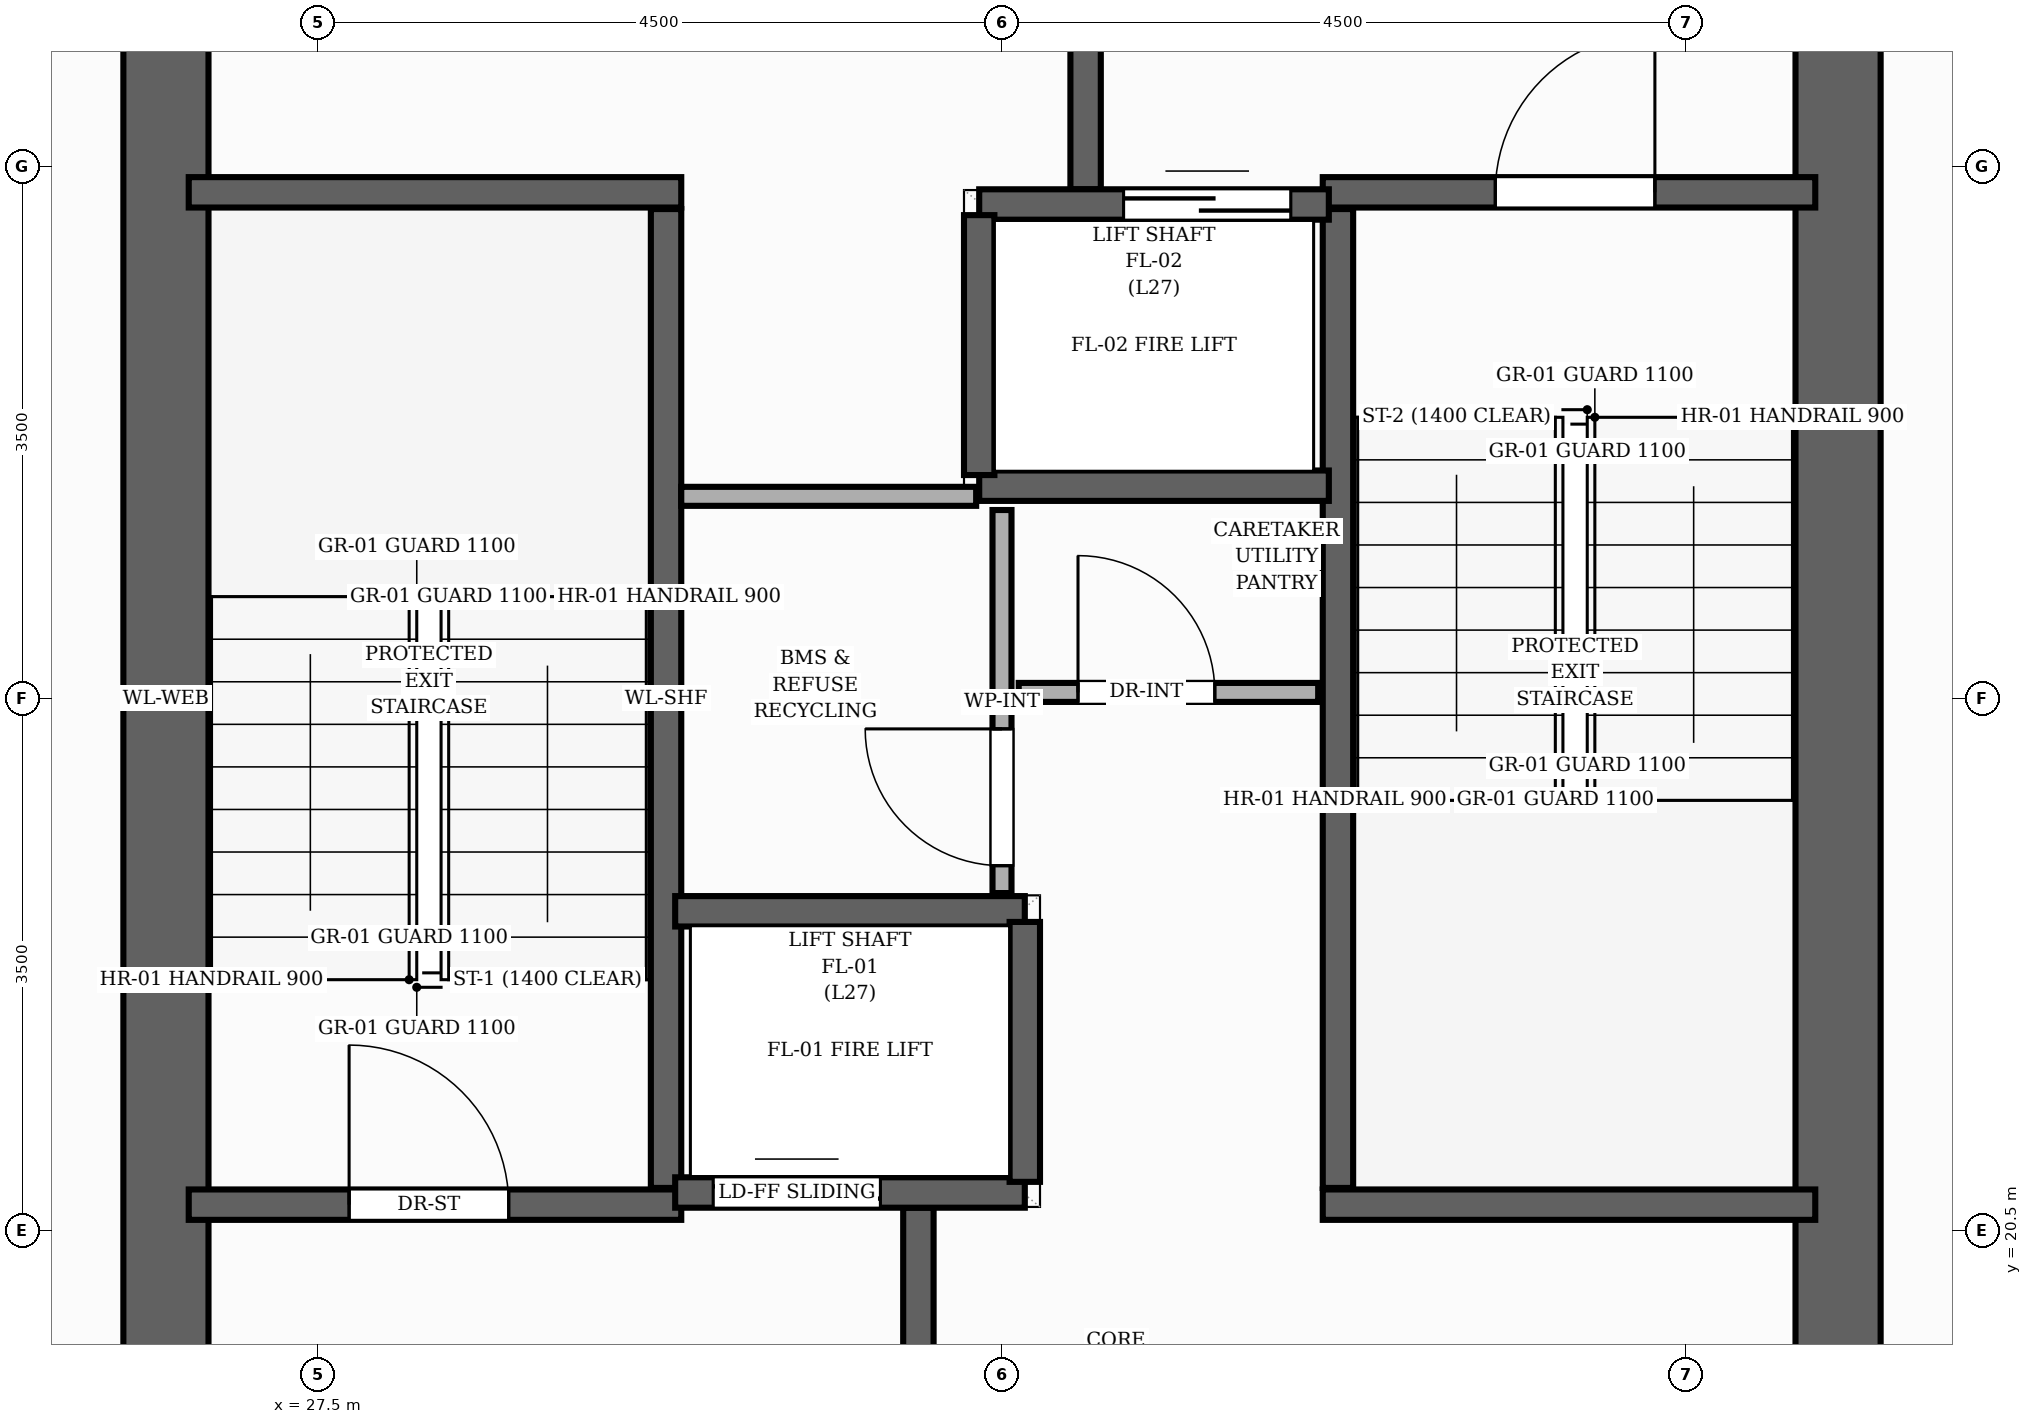
"""IFC4 building model, lengths in metres.
Left out: names, types, materials, properties, quantities, classifications, styles, units other than length and angle.
Written with IfcOpenShell. Run it as: python <this file> out.ifc"""

import sys

from ifc_helpers import new_model, si_unit, direction, frame, frame_2d, origin, place, context, subcontext, project, spatial, rectangle, extrude, element, fill, save


model = new_model("IFC4")
c1 = context("Model", 3, precision=1e-05, world=origin(), true_north=direction((0.0, 1.0)))
c2 = subcontext(c1, "Body", "Model", "MODEL_VIEW")
j1 = project(units=[si_unit("LENGTHUNIT", "METRE"), si_unit("PLANEANGLEUNIT", "RADIAN")], contexts=[c1])
p1 = place(None, origin())
s1 = spatial("IfcSite", under=j1, at=p1, CompositionType="ELEMENT")
p2 = place(p1, origin())
s2 = spatial("IfcBuilding", under=s1, at=p2, CompositionType="ELEMENT")
p3 = place(p2, frame((0.0, 0.0, 93.28)))
s3 = spatial("IfcBuildingStorey", under=s2, at=p3, CompositionType="ELEMENT", Elevation=93.28)
for number, where, z_axis, x_axis in (
    (1, (26.5, 17.35, 0.0), (0.0, 0.0, 1.0), (0.0, 1.0, 0.0)),
    (2, (37.5, 17.35, 0.0), (0.0, 0.0, 1.0), (0.0, 1.0, 0.0)),
):
    element("IfcWall", number, at=place(p3, frame(where, z_axis=z_axis, x_axis=x_axis)), inside=s3, PredefinedType="SHEAR", context=c2, shape_type="SweptSolid", body=[
        extrude(rectangle(XDim=13.3, YDim=0.56, at=frame_2d((6.65, 0.0))), origin(), (0.0, 0.0, 1.0), 3.2),
    ])
p4 = place(p3, frame((29.79, 20.78, 0.0), z_axis=(0.0, 0.0, 1.0), x_axis=(0.0, 1.0, 0.0)))
e3 = element("IfcWall", 3, at=p4, inside=s3, PredefinedType="SHEAR", context=c2, shape_type="SweptSolid", body=[
    extrude(rectangle(XDim=6.44, YDim=0.2, at=frame_2d((3.22, 0.0))), origin(), (0.0, 0.0, 1.0), 3.2),
])
p5 = place(p3, frame((26.65, 27.33, 0.0), z_axis=(0.0, 0.0, 1.0), x_axis=(1.0, 0.0, 0.0)))
e4 = element("IfcWall", 4, at=p5, inside=s3, PredefinedType="SHEAR", context=c2, shape_type="SweptSolid", body=[
    extrude(rectangle(XDim=3.24, YDim=0.2, at=frame_2d((1.62, 0.0))), origin(), (0.0, 0.0, 1.0), 3.2),
])
p6 = place(p3, frame((26.65, 20.67, 0.0), z_axis=(0.0, 0.0, 1.0), x_axis=(1.0, 0.0, 0.0)))
e5 = element("IfcWall", 5, at=p6, inside=s3, PredefinedType="SHEAR", context=c2, shape_type="SweptSolid", body=[
    extrude(rectangle(XDim=3.24, YDim=0.2, at=frame_2d((1.62, 0.0))), origin(), (0.0, 0.0, 1.0), 3.2),
])
p7 = place(p6, frame((1.055, 0.0, 0.0)))
e6 = element("IfcOpeningElement", 6, at=p7, cuts=e5, PredefinedType="OPENING", context=c2, shape_type="SweptSolid", body=[
    extrude(rectangle(XDim=1.05, YDim=2.15, at=frame_2d((0.525, 1.075))), frame((0.0, 0.11, 0.0), z_axis=(0.0, -1.0, 0.0), x_axis=(1.0, 0.0, 0.0)), (0.0, 0.0, 1.0), 0.22),
])
p8 = place(p3, frame((34.21, 20.78, 0.0), z_axis=(0.0, 0.0, 1.0), x_axis=(0.0, 1.0, 0.0)))
e7 = element("IfcWall", 7, at=p8, inside=s3, PredefinedType="SHEAR", context=c2, shape_type="SweptSolid", body=[
    extrude(rectangle(XDim=6.44, YDim=0.2, at=frame_2d((3.22, 0.0))), origin(), (0.0, 0.0, 1.0), 3.2),
])
p9 = place(p3, frame((34.11, 20.67, 0.0), z_axis=(0.0, 0.0, 1.0), x_axis=(1.0, 0.0, 0.0)))
e8 = element("IfcWall", 8, at=p9, inside=s3, PredefinedType="SHEAR", context=c2, shape_type="SweptSolid", body=[
    extrude(rectangle(XDim=3.24, YDim=0.2, at=frame_2d((1.62, 0.0))), origin(), (0.0, 0.0, 1.0), 3.2),
])
p10 = place(p3, frame((34.11, 27.33, 0.0), z_axis=(0.0, 0.0, 1.0), x_axis=(1.0, 0.0, 0.0)))
e9 = element("IfcWall", 9, at=p10, inside=s3, PredefinedType="SHEAR", context=c2, shape_type="SweptSolid", body=[
    extrude(rectangle(XDim=3.24, YDim=0.2, at=frame_2d((1.62, 0.0))), origin(), (0.0, 0.0, 1.0), 3.2),
])
p11 = place(p10, frame((1.135, 0.0, 0.0)))
e10 = element("IfcOpeningElement", 10, at=p11, cuts=e9, PredefinedType="OPENING", context=c2, shape_type="SweptSolid", body=[
    extrude(rectangle(XDim=1.05, YDim=2.15, at=frame_2d((0.525, 1.075))), frame((0.0, 0.11, 0.0), z_axis=(0.0, -1.0, 0.0), x_axis=(1.0, 0.0, 0.0)), (0.0, 0.0, 1.0), 0.22),
])
for number, where, z_axis, x_axis in (
    (11, (31.45, 17.15, 0.0), (0.0, 0.0, 1.0), (0.0, 1.0, 0.0)),
    (12, (32.55, 27.35, 0.0), (0.0, 0.0, 1.0), (0.0, 1.0, 0.0)),
):
    element("IfcWall", number, at=place(p3, frame(where, z_axis=z_axis, x_axis=x_axis)), inside=s3, PredefinedType="SHEAR", context=c2, shape_type="SweptSolid", body=[
        extrude(rectangle(XDim=3.5, YDim=0.2, at=frame_2d((1.75, 0.0))), origin(), (0.0, 0.0, 1.0), 3.2),
    ])
p12 = place(p3, frame((29.85, 20.75, 0.0), z_axis=(0.0, 0.0, 1.0), x_axis=(1.0, 0.0, 0.0)))
e13 = element("IfcWall", 13, at=p12, inside=s3, PredefinedType="SHEAR", context=c2, shape_type="SweptSolid", body=[
    extrude(rectangle(XDim=2.3, YDim=0.2, at=frame_2d((1.15, 0.0))), origin(), (0.0, 0.0, 1.0), 3.2),
])
p13 = place(p12, frame((0.25, 0.0, 0.0)))
e14 = element("IfcOpeningElement", 14, at=p13, cuts=e13, PredefinedType="OPENING", context=c2, shape_type="SweptSolid", body=[
    extrude(rectangle(XDim=1.1, YDim=2.15, at=frame_2d((0.55, 1.075))), frame((0.0, 0.11, 0.0), z_axis=(0.0, -1.0, 0.0), x_axis=(1.0, 0.0, 0.0)), (0.0, 0.0, 1.0), 0.22),
])
p14 = place(p3, frame((29.85, 22.6, 0.0), z_axis=(0.0, 0.0, 1.0), x_axis=(1.0, 0.0, 0.0)))
e15 = element("IfcWall", 15, at=p14, inside=s3, PredefinedType="SHEAR", context=c2, shape_type="SweptSolid", body=[
    extrude(rectangle(XDim=2.3, YDim=0.2, at=frame_2d((1.15, 0.0))), origin(), (0.0, 0.0, 1.0), 3.2),
])
p15 = place(p3, frame((32.15, 20.82, 0.0), z_axis=(0.0, 0.0, 1.0), x_axis=(0.0, 1.0, 0.0)))
e16 = element("IfcWall", 16, at=p15, inside=s3, PredefinedType="SHEAR", context=c2, shape_type="SweptSolid", body=[
    extrude(rectangle(XDim=1.71, YDim=0.2, at=frame_2d((0.855, 0.0))), origin(), (0.0, 0.0, 1.0), 3.2),
])
p16 = place(p3, frame((31.85, 27.25, 0.0), z_axis=(0.0, 0.0, 1.0), x_axis=(1.0, 0.0, 0.0)))
e17 = element("IfcWall", 17, at=p16, inside=s3, PredefinedType="SHEAR", context=c2, shape_type="SweptSolid", body=[
    extrude(rectangle(XDim=2.3, YDim=0.2, at=frame_2d((1.15, 0.0))), origin(), (0.0, 0.0, 1.0), 3.2),
])
p17 = place(p16, frame((0.95, 0.0, 0.0)))
e18 = element("IfcOpeningElement", 18, at=p17, cuts=e17, PredefinedType="OPENING", context=c2, shape_type="SweptSolid", body=[
    extrude(rectangle(XDim=1.1, YDim=2.15, at=frame_2d((0.55, 1.075))), frame((0.0, 0.11, 0.0), z_axis=(0.0, -1.0, 0.0), x_axis=(1.0, 0.0, 0.0)), (0.0, 0.0, 1.0), 0.22),
])
p18 = place(p3, frame((31.85, 25.4, 0.0), z_axis=(0.0, 0.0, 1.0), x_axis=(1.0, 0.0, 0.0)))
e19 = element("IfcWall", 19, at=p18, inside=s3, PredefinedType="SHEAR", context=c2, shape_type="SweptSolid", body=[
    extrude(rectangle(XDim=2.3, YDim=0.2, at=frame_2d((1.15, 0.0))), origin(), (0.0, 0.0, 1.0), 3.2),
])
p19 = place(p3, frame((31.85, 25.47, 0.0), z_axis=(0.0, 0.0, 1.0), x_axis=(0.0, 1.0, 0.0)))
e20 = element("IfcWall", 20, at=p19, inside=s3, PredefinedType="SHEAR", context=c2, shape_type="SweptSolid", body=[
    extrude(rectangle(XDim=1.71, YDim=0.2, at=frame_2d((0.855, 0.0))), origin(), (0.0, 0.0, 1.0), 3.2),
])
p20 = place(p3, frame((32.0, 22.72, 0.0), z_axis=(0.0, 0.0, 1.0), x_axis=(0.0, 1.0, 0.0)))
e21 = element("IfcWall", 21, at=p20, inside=s3, PredefinedType="PARTITIONING", context=c2, shape_type="SweptSolid", body=[
    extrude(rectangle(XDim=2.52, YDim=0.125, at=frame_2d((1.26, 0.0))), origin(), (0.0, 0.0, 1.0), 2.955),
])
p21 = place(p20, frame((0.18, 0.0, 0.0)))
e22 = element("IfcOpeningElement", 22, at=p21, cuts=e21, PredefinedType="OPENING", context=c2, shape_type="SweptSolid", body=[
    extrude(rectangle(XDim=0.9, YDim=2.1, at=frame_2d((0.45, 1.05))), frame((0.0, 0.073, 0.0), z_axis=(0.0, -1.0, 0.0), x_axis=(1.0, 0.0, 0.0)), (0.0, 0.0, 1.0), 0.145),
])
p22 = place(p3, frame((32.11, 24.04, 0.0), z_axis=(0.0, 0.0, 1.0), x_axis=(1.0, 0.0, 0.0)))
e23 = element("IfcWall", 23, at=p22, inside=s3, PredefinedType="PARTITIONING", context=c2, shape_type="SweptSolid", body=[
    extrude(rectangle(XDim=1.97, YDim=0.125, at=frame_2d((0.985, 0.0))), origin(), (0.0, 0.0, 1.0), 2.955),
])
p23 = place(p22, frame((0.39, 0.0, 0.0)))
e24 = element("IfcOpeningElement", 24, at=p23, cuts=e23, PredefinedType="OPENING", context=c2, shape_type="SweptSolid", body=[
    extrude(rectangle(XDim=0.9, YDim=2.1, at=frame_2d((0.45, 1.05))), frame((0.0, 0.073, 0.0), z_axis=(0.0, -1.0, 0.0), x_axis=(1.0, 0.0, 0.0)), (0.0, 0.0, 1.0), 0.145),
])
p24 = place(p3, frame((29.89, 25.33, 0.0), z_axis=(0.0, 0.0, 1.0), x_axis=(1.0, 0.0, 0.0)))
e25 = element("IfcWall", 25, at=p24, inside=s3, PredefinedType="PARTITIONING", context=c2, shape_type="SweptSolid", body=[
    extrude(rectangle(XDim=1.94, YDim=0.125, at=frame_2d((0.97, 0.0))), origin(), (0.0, 0.0, 1.0), 2.955),
])
p25 = place(p7, origin())
e26 = element("IfcDoor", 26, at=p25, inside=s3, OperationType="SINGLE_SWING_LEFT", PredefinedType="DOOR", context=c2, shape_type="SweptSolid", body=[
    extrude(rectangle(XDim=1.05, YDim=2.15, at=frame_2d((0.525, 1.075))), frame((0.0, 0.025, 0.0), z_axis=(0.0, -1.0, 0.0), x_axis=(1.0, 0.0, 0.0)), (0.0, 0.0, 1.0), 0.05),
])
fill(e6, e26)
p26 = place(p11, origin())
e27 = element("IfcDoor", 27, at=p26, inside=s3, OperationType="SINGLE_SWING_RIGHT", PredefinedType="DOOR", context=c2, shape_type="SweptSolid", body=[
    extrude(rectangle(XDim=1.05, YDim=2.15, at=frame_2d((0.525, 1.075))), frame((0.0, 0.025, 0.0), z_axis=(0.0, -1.0, 0.0), x_axis=(1.0, 0.0, 0.0)), (0.0, 0.0, 1.0), 0.05),
])
fill(e10, e27)
p27 = place(p13, origin())
e28 = element("IfcDoor", 28, at=p27, inside=s3, OperationType="DOUBLE_DOOR_SLIDING", PredefinedType="DOOR", context=c2, shape_type="SweptSolid", body=[
    extrude(rectangle(XDim=1.1, YDim=2.15, at=frame_2d((0.55, 1.075))), frame((0.0, 0.025, 0.0), z_axis=(0.0, -1.0, 0.0), x_axis=(1.0, 0.0, 0.0)), (0.0, 0.0, 1.0), 0.05),
])
fill(e14, e28)
p28 = place(p17, origin())
e29 = element("IfcDoor", 29, at=p28, inside=s3, OperationType="DOUBLE_DOOR_SLIDING", PredefinedType="DOOR", context=c2, shape_type="SweptSolid", body=[
    extrude(rectangle(XDim=1.1, YDim=2.15, at=frame_2d((0.55, 1.075))), frame((0.0, 0.025, 0.0), z_axis=(0.0, -1.0, 0.0), x_axis=(1.0, 0.0, 0.0)), (0.0, 0.0, 1.0), 0.05),
])
fill(e18, e29)
p29 = place(p23, origin())
e30 = element("IfcDoor", 30, at=p29, inside=s3, OperationType="SINGLE_SWING_LEFT", PredefinedType="DOOR", context=c2, shape_type="SweptSolid", body=[
    extrude(rectangle(XDim=0.9, YDim=2.1, at=frame_2d((0.45, 1.05))), frame((0.0, 0.025, 0.0), z_axis=(0.0, -1.0, 0.0), x_axis=(1.0, 0.0, 0.0)), (0.0, 0.0, 1.0), 0.05),
])
fill(e24, e30)
p30 = place(p21, origin())
e31 = element("IfcDoor", 31, at=p30, inside=s3, OperationType="SINGLE_SWING_RIGHT", PredefinedType="DOOR", context=c2, shape_type="SweptSolid", body=[
    extrude(rectangle(XDim=0.9, YDim=2.1, at=frame_2d((0.45, 1.05))), frame((0.0, 0.025, 0.0), z_axis=(0.0, -1.0, 0.0), x_axis=(1.0, 0.0, 0.0)), (0.0, 0.0, 1.0), 0.05),
])
fill(e22, e31)
save(model, sys.argv[1])
